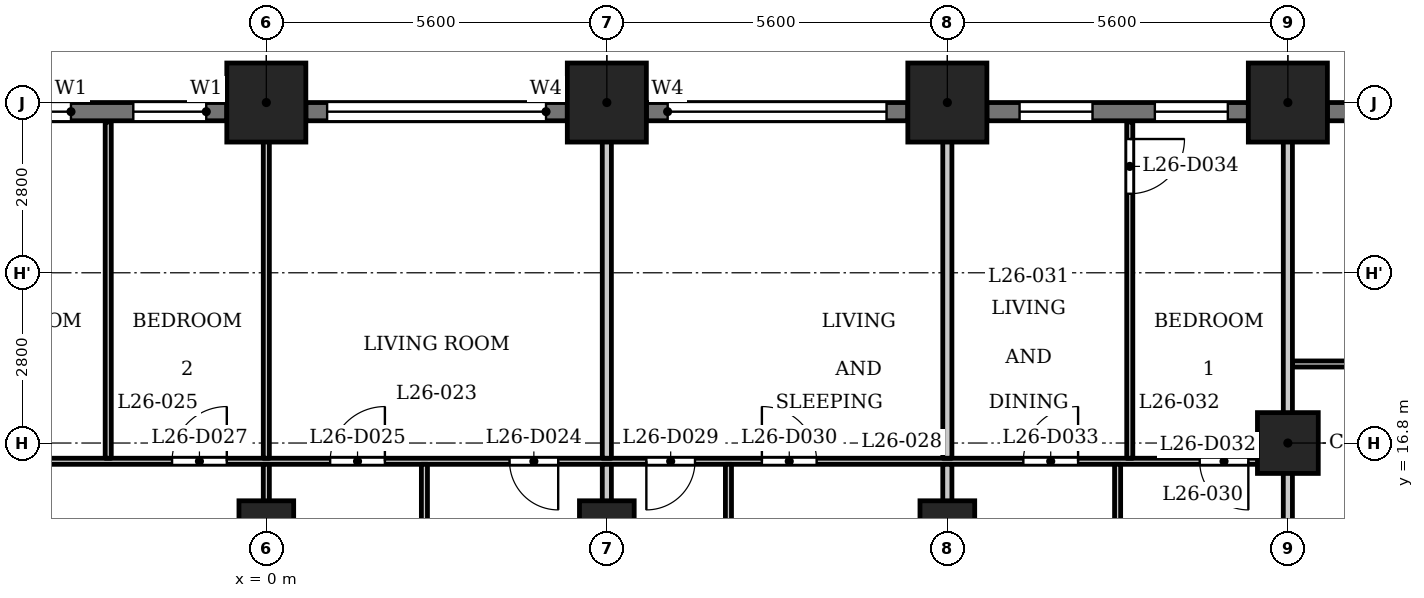
"""IFC4 building model, lengths in metres.
Left out: names, types, materials, properties, quantities, classifications, styles, units other than length and angle.
Written with IfcOpenShell. Run it as: python <this file> out.ifc"""

import sys

from ifc_helpers import new_model, si_unit, direction, frame, frame_2d, origin, origin_2d, place, context, subcontext, project, spatial, rectangle, extrude, element, fill, save


model = new_model("IFC4")
c1 = context("Model", 3, precision=1e-05, world=origin(), true_north=direction((0.0, 1.0)))
c2 = subcontext(c1, "Body", "Model", "MODEL_VIEW")
j1 = project(units=[si_unit("LENGTHUNIT", "METRE"), si_unit("PLANEANGLEUNIT", "RADIAN")], contexts=[c1])
p1 = place(None, origin())
s1 = spatial("IfcSite", under=j1, at=p1, CompositionType="ELEMENT")
p2 = place(p1, origin())
s2 = spatial("IfcBuilding", under=s1, at=p2, CompositionType="ELEMENT")
p3 = place(p2, frame((0.0, 0.0, 104.3)))
s3 = spatial("IfcBuildingStorey", under=s2, at=p3, CompositionType="ELEMENT", Elevation=104.3)
for number, where, z_axis, x_axis in (
    (1, (16.8, 22.4, 0.0), (0.0, 0.0, 1.0), (1.0, 0.0, 0.0)),
    (2, (11.2, 22.4, 0.0), (0.0, 0.0, 1.0), (1.0, 0.0, 0.0)),
    (3, (5.6, 22.4, 0.0), (0.0, 0.0, 1.0), (1.0, 0.0, 0.0)),
    (4, (0.0, 22.4, 0.0), (0.0, 0.0, 1.0), (1.0, 0.0, 0.0)),
):
    element("IfcColumn", number, at=place(p3, frame(where, z_axis=z_axis, x_axis=x_axis)), inside=s3, PredefinedType="COLUMN", context=c2, shape_type="SweptSolid", body=[
        extrude(rectangle(XDim=1.3, YDim=1.3, at=origin_2d()), origin(), (0.0, 0.0, 1.0), 3.5),
    ])
p4 = place(p3, frame((16.8, 16.8, 0.0), z_axis=(0.0, 0.0, 1.0), x_axis=(1.0, 0.0, 0.0)))
e5 = element("IfcColumn", 5, at=p4, inside=s3, PredefinedType="COLUMN", context=c2, shape_type="SweptSolid", body=[
    extrude(rectangle(XDim=1.0, YDim=1.0, at=origin_2d()), origin(), (0.0, 0.0, 1.0), 3.5),
])
for number, where, z_axis, x_axis in (
    (6, (0.0, 15.4, 0.0), (0.0, 0.0, 1.0), (1.0, 0.0, 0.0)),
    (7, (5.6, 15.4, 0.0), (0.0, 0.0, 1.0), (1.0, 0.0, 0.0)),
    (8, (11.2, 15.4, 0.0), (0.0, 0.0, 1.0), (1.0, 0.0, 0.0)),
):
    element("IfcColumn", number, at=place(p3, frame(where, z_axis=z_axis, x_axis=x_axis)), inside=s3, PredefinedType="COLUMN", context=c2, shape_type="SweptSolid", body=[
        extrude(rectangle(XDim=0.9, YDim=0.9, at=origin_2d()), origin(), (0.0, 0.0, 1.0), 3.5),
    ])
p5 = place(p3, frame((20.0, 22.25, 0.0), z_axis=(0.0, 0.0, 1.0), x_axis=(-1.0, 0.0, 0.0)))
e9 = element("IfcWall", 9, at=p5, inside=s3, PredefinedType="SOLIDWALL", context=c2, shape_type="SweptSolid", body=[
    extrude(rectangle(XDim=2.55, YDim=0.3, at=frame_2d((1.275, 0.0))), origin(), (0.0, 0.0, 1.0), 2.4),
])
p6 = place(p5, frame((0.675, 0.0, 0.6)))
e10 = element("IfcOpeningElement", 10, at=p6, cuts=e9, PredefinedType="OPENING", context=c2, shape_type="SweptSolid", body=[
    extrude(rectangle(XDim=1.2, YDim=1.55, at=frame_2d((0.6, 0.775))), frame((0.0, 0.16, 0.0), z_axis=(0.0, -1.0, 0.0), x_axis=(1.0, 0.0, 0.0)), (0.0, 0.0, 1.0), 0.32),
])
p7 = place(p3, frame((16.15, 22.25, 0.0), z_axis=(0.0, 0.0, 1.0), x_axis=(-1.0, 0.0, 0.0)))
e11 = element("IfcWall", 11, at=p7, inside=s3, PredefinedType="SOLIDWALL", context=c2, shape_type="SweptSolid", body=[
    extrude(rectangle(XDim=4.3, YDim=0.3, at=frame_2d((2.15, 0.0))), origin(), (0.0, 0.0, 1.0), 2.4),
])
p8 = place(p7, frame((0.337, 0.0, 0.6)))
e12 = element("IfcOpeningElement", 12, at=p8, cuts=e11, PredefinedType="OPENING", context=c2, shape_type="SweptSolid", body=[
    extrude(rectangle(XDim=1.2, YDim=1.55, at=frame_2d((0.6, 0.775))), frame((0.0, 0.16, 0.0), z_axis=(0.0, -1.0, 0.0), x_axis=(1.0, 0.0, 0.0)), (0.0, 0.0, 1.0), 0.32),
])
p9 = place(p7, frame((2.562, 0.0, 0.6)))
e13 = element("IfcOpeningElement", 13, at=p9, cuts=e11, PredefinedType="OPENING", context=c2, shape_type="SweptSolid", body=[
    extrude(rectangle(XDim=1.2, YDim=1.55, at=frame_2d((0.6, 0.775))), frame((0.0, 0.16, 0.0), z_axis=(0.0, -1.0, 0.0), x_axis=(1.0, 0.0, 0.0)), (0.0, 0.0, 1.0), 0.32),
])
p10 = place(p3, frame((10.55, 22.25, 0.0), z_axis=(0.0, 0.0, 1.0), x_axis=(-1.0, 0.0, 0.0)))
e14 = element("IfcWall", 14, at=p10, inside=s3, PredefinedType="SOLIDWALL", context=c2, shape_type="SweptSolid", body=[
    extrude(rectangle(XDim=4.3, YDim=0.3, at=frame_2d((2.15, 0.0))), origin(), (0.0, 0.0, 1.0), 2.4),
])
p11 = place(p10, frame((0.35, 0.0, 1.2)))
e15 = element("IfcOpeningElement", 15, at=p11, cuts=e14, PredefinedType="OPENING", context=c2, shape_type="SweptSolid", body=[
    extrude(rectangle(XDim=3.6, YDim=0.95, at=frame_2d((1.8, 0.475))), frame((0.0, 0.16, 0.0), z_axis=(0.0, -1.0, 0.0), x_axis=(1.0, 0.0, 0.0)), (0.0, 0.0, 1.0), 0.32),
])
p12 = place(p3, frame((4.95, 22.25, 0.0), z_axis=(0.0, 0.0, 1.0), x_axis=(-1.0, 0.0, 0.0)))
e16 = element("IfcWall", 16, at=p12, inside=s3, PredefinedType="SOLIDWALL", context=c2, shape_type="SweptSolid", body=[
    extrude(rectangle(XDim=4.3, YDim=0.3, at=frame_2d((2.15, 0.0))), origin(), (0.0, 0.0, 1.0), 2.4),
])
p13 = place(p12, frame((0.35, 0.0, 1.2)))
e17 = element("IfcOpeningElement", 17, at=p13, cuts=e16, PredefinedType="OPENING", context=c2, shape_type="SweptSolid", body=[
    extrude(rectangle(XDim=3.6, YDim=0.95, at=frame_2d((1.8, 0.475))), frame((0.0, 0.16, 0.0), z_axis=(0.0, -1.0, 0.0), x_axis=(1.0, 0.0, 0.0)), (0.0, 0.0, 1.0), 0.32),
])
p14 = place(p3, frame((-0.65, 22.25, 0.0), z_axis=(0.0, 0.0, 1.0), x_axis=(-1.0, 0.0, 0.0)))
e18 = element("IfcWall", 18, at=p14, inside=s3, PredefinedType="SOLIDWALL", context=c2, shape_type="SweptSolid", body=[
    extrude(rectangle(XDim=4.3, YDim=0.3, at=frame_2d((2.15, 0.0))), origin(), (0.0, 0.0, 1.0), 2.4),
])
p15 = place(p14, frame((0.337, 0.0, 0.6)))
e19 = element("IfcOpeningElement", 19, at=p15, cuts=e18, PredefinedType="OPENING", context=c2, shape_type="SweptSolid", body=[
    extrude(rectangle(XDim=1.2, YDim=1.55, at=frame_2d((0.6, 0.775))), frame((0.0, 0.16, 0.0), z_axis=(0.0, -1.0, 0.0), x_axis=(1.0, 0.0, 0.0)), (0.0, 0.0, 1.0), 0.32),
])
p16 = place(p14, frame((2.562, 0.0, 0.6)))
e20 = element("IfcOpeningElement", 20, at=p16, cuts=e18, PredefinedType="OPENING", context=c2, shape_type="SweptSolid", body=[
    extrude(rectangle(XDim=1.2, YDim=1.55, at=frame_2d((0.6, 0.775))), frame((0.0, 0.16, 0.0), z_axis=(0.0, -1.0, 0.0), x_axis=(1.0, 0.0, 0.0)), (0.0, 0.0, 1.0), 0.32),
])
p17 = place(p3, frame((-16.725, 16.5, 0.0), z_axis=(0.0, 0.0, 1.0), x_axis=(1.0, 0.0, 0.0)))
e21 = element("IfcWall", 21, at=p17, inside=s3, PredefinedType="PARTITIONING", context=c2, shape_type="SweptSolid", body=[
    extrude(rectangle(XDim=33.45, YDim=0.1, at=frame_2d((16.725, 0.0))), origin(), (0.0, 0.0, 1.0), 3.2),
])
p18 = place(p17, frame((1.075, 0.0, 0.0)))
e22 = element("IfcOpeningElement", 22, at=p18, cuts=e21, PredefinedType="OPENING", context=c2, shape_type="SweptSolid", body=[
    extrude(rectangle(XDim=0.8, YDim=2.1, at=frame_2d((0.4, 1.05))), frame((0.0, 0.06, 0.0), z_axis=(0.0, -1.0, 0.0), x_axis=(1.0, 0.0, 0.0)), (0.0, 0.0, 1.0), 0.12),
])
p19 = place(p17, frame((3.975, 0.0, 0.0)))
e23 = element("IfcOpeningElement", 23, at=p19, cuts=e21, PredefinedType="OPENING", context=c2, shape_type="SweptSolid", body=[
    extrude(rectangle(XDim=0.9, YDim=2.1, at=frame_2d((0.45, 1.05))), frame((0.0, 0.06, 0.0), z_axis=(0.0, -1.0, 0.0), x_axis=(1.0, 0.0, 0.0)), (0.0, 0.0, 1.0), 0.12),
])
p20 = place(p17, frame((8.975, 0.0, 0.0)))
e24 = element("IfcOpeningElement", 24, at=p20, cuts=e21, PredefinedType="OPENING", context=c2, shape_type="SweptSolid", body=[
    extrude(rectangle(XDim=0.8, YDim=2.1, at=frame_2d((0.4, 1.05))), frame((0.0, 0.06, 0.0), z_axis=(0.0, -1.0, 0.0), x_axis=(1.0, 0.0, 0.0)), (0.0, 0.0, 1.0), 0.12),
])
p21 = place(p17, frame((6.325, 0.0, 0.0)))
e25 = element("IfcOpeningElement", 25, at=p21, cuts=e21, PredefinedType="OPENING", context=c2, shape_type="SweptSolid", body=[
    extrude(rectangle(XDim=0.9, YDim=2.1, at=frame_2d((0.45, 1.05))), frame((0.0, 0.06, 0.0), z_axis=(0.0, -1.0, 0.0), x_axis=(1.0, 0.0, 0.0)), (0.0, 0.0, 1.0), 0.12),
])
p22 = place(p17, frame((20.725, 0.0, 0.0)))
e26 = element("IfcOpeningElement", 26, at=p22, cuts=e21, PredefinedType="OPENING", context=c2, shape_type="SweptSolid", body=[
    extrude(rectangle(XDim=0.8, YDim=2.1, at=frame_2d((0.4, 1.05))), frame((0.0, 0.06, 0.0), z_axis=(0.0, -1.0, 0.0), x_axis=(1.0, 0.0, 0.0)), (0.0, 0.0, 1.0), 0.12),
])
p23 = place(p17, frame((17.775, 0.0, 0.0)))
e27 = element("IfcOpeningElement", 27, at=p23, cuts=e21, PredefinedType="OPENING", context=c2, shape_type="SweptSolid", body=[
    extrude(rectangle(XDim=0.9, YDim=2.1, at=frame_2d((0.45, 1.05))), frame((0.0, 0.06, 0.0), z_axis=(0.0, -1.0, 0.0), x_axis=(1.0, 0.0, 0.0)), (0.0, 0.0, 1.0), 0.12),
])
p24 = place(p17, frame((11.825, 0.0, 0.0)))
e28 = element("IfcOpeningElement", 28, at=p24, cuts=e21, PredefinedType="OPENING", context=c2, shape_type="SweptSolid", body=[
    extrude(rectangle(XDim=0.9, YDim=2.1, at=frame_2d((0.45, 1.05))), frame((0.0, 0.06, 0.0), z_axis=(0.0, -1.0, 0.0), x_axis=(1.0, 0.0, 0.0)), (0.0, 0.0, 1.0), 0.12),
])
p25 = place(p17, frame((15.175, 0.0, 0.0)))
e29 = element("IfcOpeningElement", 29, at=p25, cuts=e21, PredefinedType="OPENING", context=c2, shape_type="SweptSolid", body=[
    extrude(rectangle(XDim=0.9, YDim=2.1, at=frame_2d((0.45, 1.05))), frame((0.0, 0.06, 0.0), z_axis=(0.0, -1.0, 0.0), x_axis=(1.0, 0.0, 0.0)), (0.0, 0.0, 1.0), 0.12),
])
p26 = place(p17, frame((22.975, 0.0, 0.0)))
e30 = element("IfcOpeningElement", 30, at=p26, cuts=e21, PredefinedType="OPENING", context=c2, shape_type="SweptSolid", body=[
    extrude(rectangle(XDim=0.8, YDim=2.1, at=frame_2d((0.4, 1.05))), frame((0.0, 0.06, 0.0), z_axis=(0.0, -1.0, 0.0), x_axis=(1.0, 0.0, 0.0)), (0.0, 0.0, 1.0), 0.12),
])
p27 = place(p17, frame((24.875, 0.0, 0.0)))
e31 = element("IfcOpeningElement", 31, at=p27, cuts=e21, PredefinedType="OPENING", context=c2, shape_type="SweptSolid", body=[
    extrude(rectangle(XDim=0.9, YDim=2.1, at=frame_2d((0.45, 1.05))), frame((0.0, 0.06, 0.0), z_axis=(0.0, -1.0, 0.0), x_axis=(1.0, 0.0, 0.0)), (0.0, 0.0, 1.0), 0.12),
])
p28 = place(p17, frame((32.075, 0.0, 0.0)))
e32 = element("IfcOpeningElement", 32, at=p28, cuts=e21, PredefinedType="OPENING", context=c2, shape_type="SweptSolid", body=[
    extrude(rectangle(XDim=0.8, YDim=2.1, at=frame_2d((0.4, 1.05))), frame((0.0, 0.06, 0.0), z_axis=(0.0, -1.0, 0.0), x_axis=(1.0, 0.0, 0.0)), (0.0, 0.0, 1.0), 0.12),
])
p29 = place(p17, frame((29.175, 0.0, 0.0)))
e33 = element("IfcOpeningElement", 33, at=p29, cuts=e21, PredefinedType="OPENING", context=c2, shape_type="SweptSolid", body=[
    extrude(rectangle(XDim=0.9, YDim=2.1, at=frame_2d((0.45, 1.05))), frame((0.0, 0.06, 0.0), z_axis=(0.0, -1.0, 0.0), x_axis=(1.0, 0.0, 0.0)), (0.0, 0.0, 1.0), 0.12),
])
p30 = place(p3, frame((16.875, 18.1, 0.0), z_axis=(0.0, 0.0, 1.0), x_axis=(1.0, 0.0, 0.0)))
e34 = element("IfcWall", 34, at=p30, inside=s3, PredefinedType="PARTITIONING", context=c2, shape_type="SweptSolid", body=[
    extrude(rectangle(XDim=9.315, YDim=0.1, at=frame_2d((4.658, 0.0))), origin(), (0.0, 0.0, 1.0), 3.2),
])
p31 = place(p30, frame((7.425, 0.0, 0.0)))
e35 = element("IfcOpeningElement", 35, at=p31, cuts=e34, PredefinedType="OPENING", context=c2, shape_type="SweptSolid", body=[
    extrude(rectangle(XDim=0.8, YDim=2.1, at=frame_2d((0.4, 1.05))), frame((0.0, 0.06, 0.0), z_axis=(0.0, -1.0, 0.0), x_axis=(1.0, 0.0, 0.0)), (0.0, 0.0, 1.0), 0.12),
])
p32 = place(p30, frame((3.975, 0.0, 0.0)))
e36 = element("IfcOpeningElement", 36, at=p32, cuts=e34, PredefinedType="OPENING", context=c2, shape_type="SweptSolid", body=[
    extrude(rectangle(XDim=0.9, YDim=2.1, at=frame_2d((0.45, 1.05))), frame((0.0, 0.06, 0.0), z_axis=(0.0, -1.0, 0.0), x_axis=(1.0, 0.0, 0.0)), (0.0, 0.0, 1.0), 0.12),
])
p33 = place(p3, frame((-2.6, 16.55, 0.0), z_axis=(0.0, 0.0, 1.0), x_axis=(0.0, 1.0, 0.0)))
e37 = element("IfcWall", 37, at=p33, inside=s3, PredefinedType="PARTITIONING", context=c2, shape_type="SweptSolid", body=[
    extrude(rectangle(XDim=5.53, YDim=0.1, at=frame_2d((2.765, 0.0))), origin(), (0.0, 0.0, 1.0), 3.2),
])
p34 = place(p3, frame((0.0, 13.275, 0.0), z_axis=(0.0, 0.0, 1.0), x_axis=(0.0, 1.0, 0.0)))
e38 = element("IfcWall", 38, at=p34, inside=s3, PredefinedType="PARTITIONING", context=c2, shape_type="SweptSolid", body=[
    extrude(rectangle(XDim=3.175, YDim=0.1, at=frame_2d((1.587, 0.0))), origin(), (0.0, 0.0, 1.0), 3.2),
])
p35 = place(p34, frame((0.576, 0.0, 0.0)))
e39 = element("IfcOpeningElement", 39, at=p35, cuts=e38, PredefinedType="OPENING", context=c2, shape_type="SweptSolid", body=[
    extrude(rectangle(XDim=0.9, YDim=2.1, at=frame_2d((0.45, 1.05))), frame((0.0, 0.06, 0.0), z_axis=(0.0, -1.0, 0.0), x_axis=(1.0, 0.0, 0.0)), (0.0, 0.0, 1.0), 0.12),
])
p36 = place(p3, frame((0.0, 16.55, 0.0), z_axis=(0.0, 0.0, 1.0), x_axis=(0.0, 1.0, 0.0)))
e40 = element("IfcWall", 40, at=p36, inside=s3, PredefinedType="PARTITIONING", context=c2, shape_type="SweptSolid", body=[
    extrude(rectangle(XDim=6.48, YDim=0.1, at=frame_2d((3.24, 0.0))), origin(), (0.0, 0.0, 1.0), 3.2),
])
p37 = place(p3, frame((2.6, 13.275, 0.0), z_axis=(0.0, 0.0, 1.0), x_axis=(0.0, 1.0, 0.0)))
e41 = element("IfcWall", 41, at=p37, inside=s3, PredefinedType="PARTITIONING", context=c2, shape_type="SweptSolid", body=[
    extrude(rectangle(XDim=3.175, YDim=0.1, at=frame_2d((1.587, 0.0))), origin(), (0.0, 0.0, 1.0), 3.2),
])
p38 = place(p3, frame((5.6, 13.275, 0.0), z_axis=(0.0, 0.0, 1.0), x_axis=(0.0, 1.0, 0.0)))
e42 = element("IfcWall", 42, at=p38, inside=s3, PredefinedType="PARTITIONING", context=c2, shape_type="SweptSolid", body=[
    extrude(rectangle(XDim=3.175, YDim=0.15, at=frame_2d((1.587, 0.0))), origin(), (0.0, 0.0, 1.0), 3.2),
])
p39 = place(p3, frame((5.6, 16.55, 0.0), z_axis=(0.0, 0.0, 1.0), x_axis=(0.0, 1.0, 0.0)))
e43 = element("IfcWall", 43, at=p39, inside=s3, PredefinedType="PARTITIONING", context=c2, shape_type="SweptSolid", body=[
    extrude(rectangle(XDim=6.48, YDim=0.15, at=frame_2d((3.24, 0.0))), origin(), (0.0, 0.0, 1.0), 3.2),
])
p40 = place(p3, frame((7.6, 13.275, 0.0), z_axis=(0.0, 0.0, 1.0), x_axis=(0.0, 1.0, 0.0)))
e44 = element("IfcWall", 44, at=p40, inside=s3, PredefinedType="PARTITIONING", context=c2, shape_type="SweptSolid", body=[
    extrude(rectangle(XDim=3.175, YDim=0.1, at=frame_2d((1.587, 0.0))), origin(), (0.0, 0.0, 1.0), 3.2),
])
p41 = place(p3, frame((11.2, 13.275, 0.0), z_axis=(0.0, 0.0, 1.0), x_axis=(0.0, 1.0, 0.0)))
e45 = element("IfcWall", 45, at=p41, inside=s3, PredefinedType="PARTITIONING", context=c2, shape_type="SweptSolid", body=[
    extrude(rectangle(XDim=3.175, YDim=0.15, at=frame_2d((1.587, 0.0))), origin(), (0.0, 0.0, 1.0), 3.2),
])
p42 = place(p3, frame((11.2, 16.55, 0.0), z_axis=(0.0, 0.0, 1.0), x_axis=(0.0, 1.0, 0.0)))
e46 = element("IfcWall", 46, at=p42, inside=s3, PredefinedType="PARTITIONING", context=c2, shape_type="SweptSolid", body=[
    extrude(rectangle(XDim=6.48, YDim=0.15, at=frame_2d((3.24, 0.0))), origin(), (0.0, 0.0, 1.0), 3.2),
])
p43 = place(p3, frame((14.0, 13.275, 0.0), z_axis=(0.0, 0.0, 1.0), x_axis=(0.0, 1.0, 0.0)))
e47 = element("IfcWall", 47, at=p43, inside=s3, PredefinedType="PARTITIONING", context=c2, shape_type="SweptSolid", body=[
    extrude(rectangle(XDim=3.175, YDim=0.1, at=frame_2d((1.587, 0.0))), origin(), (0.0, 0.0, 1.0), 3.2),
])
p44 = place(p3, frame((14.2, 16.55, 0.0), z_axis=(0.0, 0.0, 1.0), x_axis=(0.0, 1.0, 0.0)))
e48 = element("IfcWall", 48, at=p44, inside=s3, PredefinedType="PARTITIONING", context=c2, shape_type="SweptSolid", body=[
    extrude(rectangle(XDim=5.53, YDim=0.1, at=frame_2d((2.765, 0.0))), origin(), (0.0, 0.0, 1.0), 3.2),
])
p45 = place(p44, frame((4.35, 0.0, 0.0)))
e49 = element("IfcOpeningElement", 49, at=p45, cuts=e48, PredefinedType="OPENING", context=c2, shape_type="SweptSolid", body=[
    extrude(rectangle(XDim=0.9, YDim=2.1, at=frame_2d((0.45, 1.05))), frame((0.0, 0.06, 0.0), z_axis=(0.0, -1.0, 0.0), x_axis=(1.0, 0.0, 0.0)), (0.0, 0.0, 1.0), 0.12),
])
p46 = place(p3, frame((16.8, 15.475, 0.0), z_axis=(0.0, 0.0, 1.0), x_axis=(0.0, 1.0, 0.0)))
e50 = element("IfcWall", 50, at=p46, inside=s3, PredefinedType="PARTITIONING", context=c2, shape_type="SweptSolid", body=[
    extrude(rectangle(XDim=7.555, YDim=0.15, at=frame_2d((3.777, 0.0))), origin(), (0.0, 0.0, 1.0), 3.2),
])
p47 = place(p22, origin())
e51 = element("IfcDoor", 51, at=p47, inside=s3, OperationType="SINGLE_SWING_RIGHT", PredefinedType="DOOR", context=c2, shape_type="SweptSolid", body=[
    extrude(rectangle(XDim=0.8, YDim=2.1, at=frame_2d((0.4, 1.05))), frame((0.0, 0.025, 0.0), z_axis=(0.0, -1.0, 0.0), x_axis=(1.0, 0.0, 0.0)), (0.0, 0.0, 1.0), 0.05),
])
fill(e26, e51)
p48 = place(p23, origin())
e52 = element("IfcDoor", 52, at=p48, inside=s3, OperationType="SINGLE_SWING_LEFT", PredefinedType="DOOR", context=c2, shape_type="SweptSolid", body=[
    extrude(rectangle(XDim=0.9, YDim=2.1, at=frame_2d((0.45, 1.05))), frame((0.0, 0.025, 0.0), z_axis=(0.0, -1.0, 0.0), x_axis=(1.0, 0.0, 0.0)), (0.0, 0.0, 1.0), 0.05),
])
fill(e27, e52)
p49 = place(p25, origin())
e53 = element("IfcDoor", 53, at=p49, inside=s3, OperationType="SINGLE_SWING_LEFT", PredefinedType="DOOR", context=c2, shape_type="SweptSolid", body=[
    extrude(rectangle(XDim=0.9, YDim=2.1, at=frame_2d((0.45, 1.05))), frame((0.0, 0.025, 0.0), z_axis=(0.0, -1.0, 0.0), x_axis=(1.0, 0.0, 0.0)), (0.0, 0.0, 1.0), 0.05),
])
fill(e29, e53)
p50 = place(p26, origin())
e54 = element("IfcDoor", 54, at=p50, inside=s3, OperationType="SINGLE_SWING_LEFT", PredefinedType="DOOR", context=c2, shape_type="SweptSolid", body=[
    extrude(rectangle(XDim=0.8, YDim=2.1, at=frame_2d((0.4, 1.05))), frame((0.0, 0.025, 0.0), z_axis=(0.0, -1.0, 0.0), x_axis=(1.0, 0.0, 0.0)), (0.0, 0.0, 1.0), 0.05),
])
fill(e30, e54)
p51 = place(p27, origin())
e55 = element("IfcDoor", 55, at=p51, inside=s3, OperationType="SINGLE_SWING_RIGHT", PredefinedType="DOOR", context=c2, shape_type="SweptSolid", body=[
    extrude(rectangle(XDim=0.9, YDim=2.1, at=frame_2d((0.45, 1.05))), frame((0.0, 0.025, 0.0), z_axis=(0.0, -1.0, 0.0), x_axis=(1.0, 0.0, 0.0)), (0.0, 0.0, 1.0), 0.05),
])
fill(e31, e55)
p52 = place(p28, origin())
e56 = element("IfcDoor", 56, at=p52, inside=s3, OperationType="SINGLE_SWING_RIGHT", PredefinedType="DOOR", context=c2, shape_type="SweptSolid", body=[
    extrude(rectangle(XDim=0.8, YDim=2.1, at=frame_2d((0.4, 1.05))), frame((0.0, 0.025, 0.0), z_axis=(0.0, -1.0, 0.0), x_axis=(1.0, 0.0, 0.0)), (0.0, 0.0, 1.0), 0.05),
])
fill(e32, e56)
p53 = place(p29, origin())
e57 = element("IfcDoor", 57, at=p53, inside=s3, OperationType="SINGLE_SWING_LEFT", PredefinedType="DOOR", context=c2, shape_type="SweptSolid", body=[
    extrude(rectangle(XDim=0.9, YDim=2.1, at=frame_2d((0.45, 1.05))), frame((0.0, 0.025, 0.0), z_axis=(0.0, -1.0, 0.0), x_axis=(1.0, 0.0, 0.0)), (0.0, 0.0, 1.0), 0.05),
])
fill(e33, e57)
p54 = place(p45, origin())
e58 = element("IfcDoor", 58, at=p54, inside=s3, OperationType="SINGLE_SWING_RIGHT", PredefinedType="DOOR", context=c2, shape_type="SweptSolid", body=[
    extrude(rectangle(XDim=0.9, YDim=2.1, at=frame_2d((0.45, 1.05))), frame((0.0, 0.025, 0.0), z_axis=(0.0, -1.0, 0.0), x_axis=(1.0, 0.0, 0.0)), (0.0, 0.0, 1.0), 0.05),
])
fill(e49, e58)
p55 = place(p8, origin())
e59 = element("IfcWindow", 59, at=p55, inside=s3, PartitioningType="SINGLE_PANEL", PredefinedType="WINDOW", context=c2, shape_type="SweptSolid", body=[
    extrude(rectangle(XDim=1.2, YDim=1.55, at=frame_2d((0.6, 0.775))), frame((0.0, 0.03, 0.0), z_axis=(0.0, -1.0, 0.0), x_axis=(1.0, 0.0, 0.0)), (0.0, 0.0, 1.0), 0.06),
])
fill(e12, e59)
p56 = place(p9, origin())
e60 = element("IfcWindow", 60, at=p56, inside=s3, PartitioningType="SINGLE_PANEL", PredefinedType="WINDOW", context=c2, shape_type="SweptSolid", body=[
    extrude(rectangle(XDim=1.2, YDim=1.55, at=frame_2d((0.6, 0.775))), frame((0.0, 0.03, 0.0), z_axis=(0.0, -1.0, 0.0), x_axis=(1.0, 0.0, 0.0)), (0.0, 0.0, 1.0), 0.06),
])
fill(e13, e60)
p57 = place(p11, origin())
e61 = element("IfcWindow", 61, at=p57, inside=s3, PartitioningType="SINGLE_PANEL", PredefinedType="WINDOW", context=c2, shape_type="SweptSolid", body=[
    extrude(rectangle(XDim=3.6, YDim=0.95, at=frame_2d((1.8, 0.475))), frame((0.0, 0.03, 0.0), z_axis=(0.0, -1.0, 0.0), x_axis=(1.0, 0.0, 0.0)), (0.0, 0.0, 1.0), 0.06),
])
fill(e15, e61)
p58 = place(p13, origin())
e62 = element("IfcWindow", 62, at=p58, inside=s3, PartitioningType="SINGLE_PANEL", PredefinedType="WINDOW", context=c2, shape_type="SweptSolid", body=[
    extrude(rectangle(XDim=3.6, YDim=0.95, at=frame_2d((1.8, 0.475))), frame((0.0, 0.03, 0.0), z_axis=(0.0, -1.0, 0.0), x_axis=(1.0, 0.0, 0.0)), (0.0, 0.0, 1.0), 0.06),
])
fill(e17, e62)
p59 = place(p15, origin())
e63 = element("IfcWindow", 63, at=p59, inside=s3, PartitioningType="SINGLE_PANEL", PredefinedType="WINDOW", context=c2, shape_type="SweptSolid", body=[
    extrude(rectangle(XDim=1.2, YDim=1.55, at=frame_2d((0.6, 0.775))), frame((0.0, 0.03, 0.0), z_axis=(0.0, -1.0, 0.0), x_axis=(1.0, 0.0, 0.0)), (0.0, 0.0, 1.0), 0.06),
])
fill(e19, e63)
p60 = place(p16, origin())
e64 = element("IfcWindow", 64, at=p60, inside=s3, PartitioningType="SINGLE_PANEL", PredefinedType="WINDOW", context=c2, shape_type="SweptSolid", body=[
    extrude(rectangle(XDim=1.2, YDim=1.55, at=frame_2d((0.6, 0.775))), frame((0.0, 0.03, 0.0), z_axis=(0.0, -1.0, 0.0), x_axis=(1.0, 0.0, 0.0)), (0.0, 0.0, 1.0), 0.06),
])
fill(e20, e64)
save(model, sys.argv[1])
